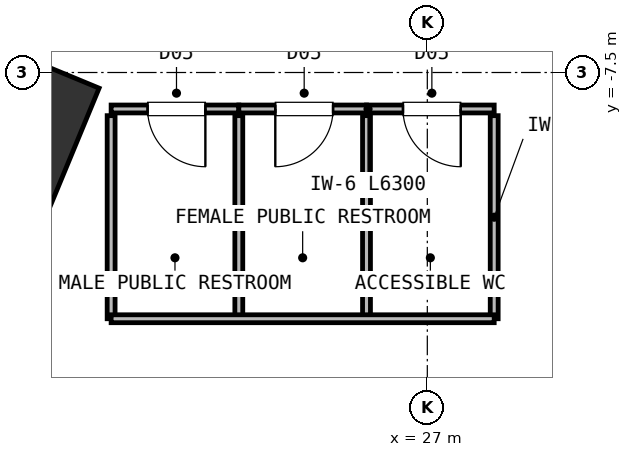
"""IFC4 building model, lengths in metres.
Left out: names, types, materials, properties, quantities, classifications, styles, units other than length and angle.
Written with IfcOpenShell. Run it as: python <this file> out.ifc"""

import sys

from ifc_helpers import new_model, si_unit, direction, frame, frame_2d, origin, origin_2d, place, context, subcontext, project, spatial, rectangle, extrude, element, fill, save


model = new_model("IFC4")
c1 = context("Model", 3, precision=1e-05, world=origin(), true_north=direction((0.0, 1.0)))
c2 = subcontext(c1, "Body", "Model", "MODEL_VIEW")
j1 = project(units=[si_unit("LENGTHUNIT", "METRE"), si_unit("PLANEANGLEUNIT", "RADIAN")], contexts=[c1])
p1 = place(None, origin())
s1 = spatial("IfcSite", under=j1, at=p1, CompositionType="ELEMENT")
p2 = place(p1, origin())
s2 = spatial("IfcBuilding", under=s1, at=p2, CompositionType="ELEMENT")
p3 = place(p2, frame((0.0, 0.0, 16.0)))
s3 = spatial("IfcBuildingStorey", under=s2, at=p3, CompositionType="ELEMENT", Elevation=16.0)
p4 = place(p3, frame((20.35, -8.429, 0.0), z_axis=(0.0, 0.0, 1.0), x_axis=(-0.923879532511, 0.382683432365, 0.0)))
e1 = element("IfcColumn", 1, at=p4, inside=s3, PredefinedType="COLUMN", context=c2, shape_type="SweptSolid", body=[
    extrude(rectangle(XDim=1.8, YDim=2.2, at=origin_2d()), origin(), (0.0, 0.0, 1.0), 5.5),
])
p5 = place(p3, frame((23.9, -8.1, 0.0), z_axis=(0.0, 0.0, 1.0), x_axis=(-1.0, 0.0, 0.0)))
e2 = element("IfcWall", 2, at=p5, inside=s3, PredefinedType="PARTITIONING", context=c2, shape_type="SweptSolid", body=[
    extrude(rectangle(XDim=2.1, YDim=0.13, at=frame_2d((1.05, 0.0))), origin(), (0.0, 0.0, 1.0), 5.22),
])
p6 = place(p5, frame((0.55, 0.0, 0.0)))
e3 = element("IfcOpeningElement", 3, at=p6, cuts=e2, PredefinedType="OPENING", context=c2, shape_type="SweptSolid", body=[
    extrude(rectangle(XDim=0.95, YDim=2.1, at=frame_2d((0.475, 1.05))), frame((0.0, 0.075, 0.0), z_axis=(0.0, -1.0, 0.0), x_axis=(1.0, 0.0, 0.0)), (0.0, 0.0, 1.0), 0.15),
])
p7 = place(p3, frame((21.8, -11.55, 0.0), z_axis=(0.0, 0.0, 1.0), x_axis=(0.0, 1.0, 0.0)))
e4 = element("IfcWall", 4, at=p7, inside=s3, PredefinedType="PARTITIONING", context=c2, shape_type="SweptSolid", body=[
    extrude(rectangle(XDim=3.34, YDim=0.13, at=frame_2d((1.67, 0.0))), origin(), (0.0, 0.0, 1.0), 5.22),
])
p8 = place(p3, frame((26.0, -8.1, 0.0), z_axis=(0.0, 0.0, 1.0), x_axis=(-1.0, 0.0, 0.0)))
e5 = element("IfcWall", 5, at=p8, inside=s3, PredefinedType="PARTITIONING", context=c2, shape_type="SweptSolid", body=[
    extrude(rectangle(XDim=2.1, YDim=0.13, at=frame_2d((1.05, 0.0))), origin(), (0.0, 0.0, 1.0), 5.22),
])
p9 = place(p8, frame((0.55, 0.0, 0.0)))
e6 = element("IfcOpeningElement", 6, at=p9, cuts=e5, PredefinedType="OPENING", context=c2, shape_type="SweptSolid", body=[
    extrude(rectangle(XDim=0.95, YDim=2.1, at=frame_2d((0.475, 1.05))), frame((0.0, 0.075, 0.0), z_axis=(0.0, -1.0, 0.0), x_axis=(1.0, 0.0, 0.0)), (0.0, 0.0, 1.0), 0.15),
])
p10 = place(p3, frame((23.9, -11.55, 0.0), z_axis=(0.0, 0.0, 1.0), x_axis=(0.0, 1.0, 0.0)))
e7 = element("IfcWall", 7, at=p10, inside=s3, PredefinedType="PARTITIONING", context=c2, shape_type="SweptSolid", body=[
    extrude(rectangle(XDim=3.34, YDim=0.13, at=frame_2d((1.67, 0.0))), origin(), (0.0, 0.0, 1.0), 5.22),
])
p11 = place(p3, frame((28.1, -8.1, 0.0), z_axis=(0.0, 0.0, 1.0), x_axis=(-1.0, 0.0, 0.0)))
e8 = element("IfcWall", 8, at=p11, inside=s3, PredefinedType="PARTITIONING", context=c2, shape_type="SweptSolid", body=[
    extrude(rectangle(XDim=2.1, YDim=0.13, at=frame_2d((1.05, 0.0))), origin(), (0.0, 0.0, 1.0), 5.22),
])
p12 = place(p11, frame((0.55, 0.0, 0.0)))
e9 = element("IfcOpeningElement", 9, at=p12, cuts=e8, PredefinedType="OPENING", context=c2, shape_type="SweptSolid", body=[
    extrude(rectangle(XDim=0.95, YDim=2.1, at=frame_2d((0.475, 1.05))), frame((0.0, 0.075, 0.0), z_axis=(0.0, -1.0, 0.0), x_axis=(1.0, 0.0, 0.0)), (0.0, 0.0, 1.0), 0.15),
])
for number, where, z_axis, x_axis in (
    (10, (26.0, -11.55, 0.0), (0.0, 0.0, 1.0), (0.0, 1.0, 0.0)),
    (11, (28.1, -11.55, 0.0), (0.0, 0.0, 1.0), (0.0, 1.0, 0.0)),
):
    element("IfcWall", number, at=place(p3, frame(where, z_axis=z_axis, x_axis=x_axis)), inside=s3, PredefinedType="PARTITIONING", context=c2, shape_type="SweptSolid", body=[
        extrude(rectangle(XDim=3.34, YDim=0.13, at=frame_2d((1.67, 0.0))), origin(), (0.0, 0.0, 1.0), 5.22),
    ])
p13 = place(p3, frame((21.8, -11.55, 0.0), z_axis=(0.0, 0.0, 1.0), x_axis=(1.0, 0.0, 0.0)))
e12 = element("IfcWall", 12, at=p13, inside=s3, PredefinedType="PARTITIONING", context=c2, shape_type="SweptSolid", body=[
    extrude(rectangle(XDim=6.3, YDim=0.13, at=frame_2d((3.15, 0.0))), origin(), (0.0, 0.0, 1.0), 5.22),
])
p14 = place(p6, origin())
e13 = element("IfcDoor", 13, at=p14, inside=s3, OperationType="SINGLE_SWING_LEFT", PredefinedType="DOOR", context=c2, shape_type="SweptSolid", body=[
    extrude(rectangle(XDim=0.95, YDim=2.1, at=frame_2d((0.475, 1.05))), frame((0.0, 0.025, 0.0), z_axis=(0.0, -1.0, 0.0), x_axis=(1.0, 0.0, 0.0)), (0.0, 0.0, 1.0), 0.05),
])
fill(e3, e13)
p15 = place(p9, origin())
e14 = element("IfcDoor", 14, at=p15, inside=s3, OperationType="SINGLE_SWING_RIGHT", PredefinedType="DOOR", context=c2, shape_type="SweptSolid", body=[
    extrude(rectangle(XDim=0.95, YDim=2.1, at=frame_2d((0.475, 1.05))), frame((0.0, 0.025, 0.0), z_axis=(0.0, -1.0, 0.0), x_axis=(1.0, 0.0, 0.0)), (0.0, 0.0, 1.0), 0.05),
])
fill(e6, e14)
p16 = place(p12, origin())
e15 = element("IfcDoor", 15, at=p16, inside=s3, OperationType="SINGLE_SWING_LEFT", PredefinedType="DOOR", context=c2, shape_type="SweptSolid", body=[
    extrude(rectangle(XDim=0.95, YDim=2.1, at=frame_2d((0.475, 1.05))), frame((0.0, 0.025, 0.0), z_axis=(0.0, -1.0, 0.0), x_axis=(1.0, 0.0, 0.0)), (0.0, 0.0, 1.0), 0.05),
])
fill(e9, e15)
save(model, sys.argv[1])
